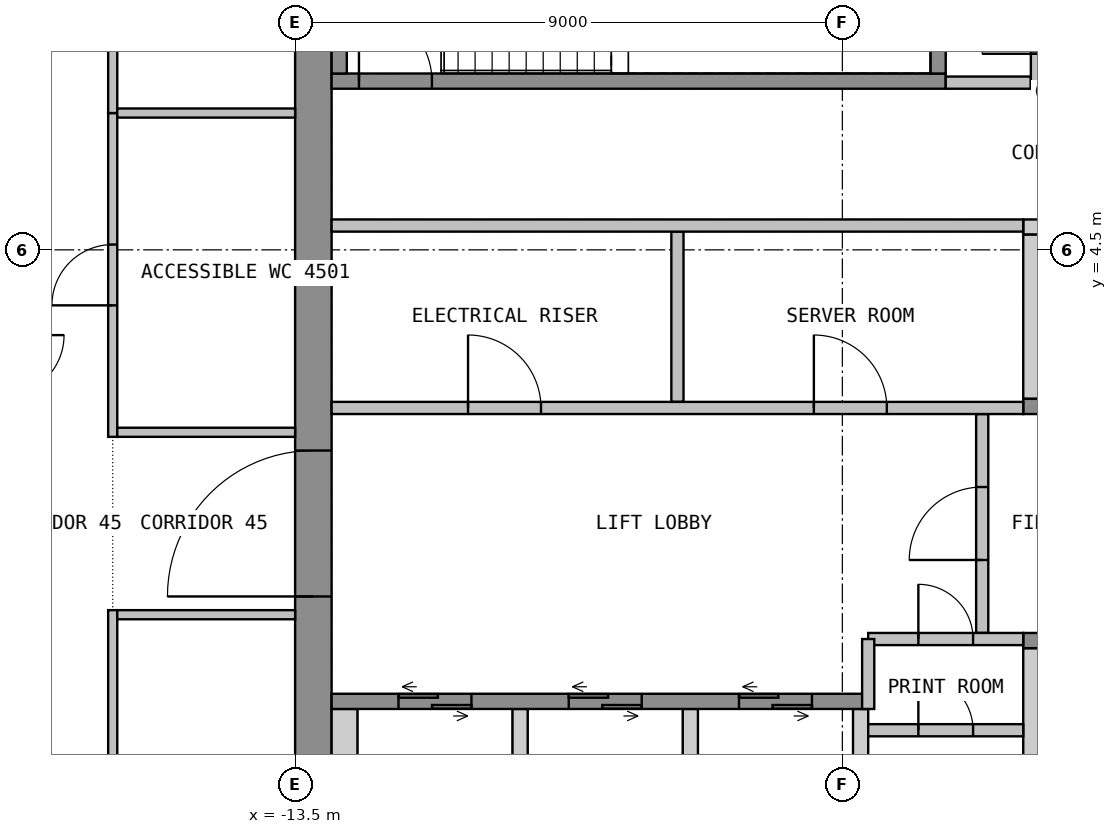
"""IFC4 building model, lengths in metres.
Left out: names, types, materials, properties, quantities, classifications, styles, units other than length and angle.
Written with IfcOpenShell. Run it as: python <this file> out.ifc"""

import sys

from ifc_helpers import new_model, si_unit, direction, frame, frame_2d, origin, place, context, subcontext, project, spatial, polyline, rectangle, outline, extrude, element, fill, save


model = new_model("IFC4")
c1 = context("Model", 3, precision=1e-05, world=origin(), true_north=direction((0.0, 1.0)))
c2 = subcontext(c1, "Body", "Model", "MODEL_VIEW")
j1 = project(units=[si_unit("LENGTHUNIT", "METRE"), si_unit("PLANEANGLEUNIT", "RADIAN")], contexts=[c1])
p1 = place(None, origin())
s1 = spatial("IfcSite", under=j1, at=p1, CompositionType="ELEMENT")
p2 = place(p1, origin())
s2 = spatial("IfcBuilding", under=s1, at=p2, CompositionType="ELEMENT")
p3 = place(p2, frame((0.0, 0.0, 183.9)))
s3 = spatial("IfcBuildingStorey", under=s2, at=p3, CompositionType="ELEMENT", Elevation=183.9)
p4 = place(p3, frame((-13.2, -10.65, 0.0), z_axis=(0.0, 0.0, 1.0), x_axis=(0.0, 1.0, 0.0)))
e1 = element("IfcWall", 1, at=p4, inside=s3, PredefinedType="SHEAR", context=c2, shape_type="SweptSolid", body=[
    extrude(rectangle(XDim=21.3, YDim=0.6, at=frame_2d((10.65, 0.0))), origin(), (0.0, 0.0, 1.0), 3.55),
])
p5 = place(p4, frame((9.45, 0.0, 0.0)))
e2 = element("IfcOpeningElement", 2, at=p5, cuts=e1, PredefinedType="OPENING", context=c2, shape_type="SweptSolid", body=[
    extrude(rectangle(XDim=2.4, YDim=2.1, at=frame_2d((1.2, 1.05))), frame((0.0, 0.31, 0.0), z_axis=(0.0, -1.0, 0.0), x_axis=(1.0, 0.0, 0.0)), (0.0, 0.0, 1.0), 0.62),
])
p6 = place(p3, origin())
e3 = element("IfcWall", 3, at=p6, inside=s3, PredefinedType="SHEAR", context=c2, shape_type="SweptSolid", body=[
    extrude(outline(polyline([(-1.525, 4.75), (1.525, 4.75), (1.525, 5.0), (-1.525, 5.0), (-1.525, 4.75)])), origin(), (0.0, 0.0, 1.0), 3.55),
])
p7 = place(p3, origin())
e4 = element("IfcWall", 4, at=p7, inside=s3, PredefinedType="SHEAR", context=c2, shape_type="SweptSolid", body=[
    extrude(outline(polyline([(-1.525, 2.05), (-1.275, 2.05), (-1.275, 4.75), (-1.525, 4.75), (-1.525, 2.05)])), origin(), (0.0, 0.0, 1.0), 3.55),
])
p8 = place(p3, frame((-1.525, 1.925, 0.0), z_axis=(0.0, 0.0, 1.0), x_axis=(1.0, 0.0, 0.0)))
e5 = element("IfcWall", 5, at=p8, inside=s3, PredefinedType="SHEAR", context=c2, shape_type="SweptSolid", body=[
    extrude(rectangle(XDim=3.05, YDim=0.25, at=frame_2d((1.525, 0.0))), origin(), (0.0, 0.0, 1.0), 3.55),
])
p9 = place(p8, frame((0.925, 0.0, 0.0)))
e6 = element("IfcOpeningElement", 6, at=p9, cuts=e5, PredefinedType="OPENING", context=c2, shape_type="SweptSolid", body=[
    extrude(rectangle(XDim=1.2, YDim=2.1, at=frame_2d((0.6, 1.05))), frame((0.0, 0.135, 0.0), z_axis=(0.0, -1.0, 0.0), x_axis=(1.0, 0.0, 0.0)), (0.0, 0.0, 1.0), 0.27),
])
p10 = place(p3, origin())
e7 = element("IfcWall", 7, at=p10, inside=s3, PredefinedType="SHEAR", context=c2, shape_type="SweptSolid", body=[
    extrude(outline(polyline([(-12.9, -4.75), (-12.475, -4.75), (-12.475, -3.05), (-12.9, -3.05), (-12.9, -4.75)])), origin(), (0.0, 0.0, 1.0), 3.55),
])
p11 = place(p3, origin())
e8 = element("IfcWall", 8, at=p11, inside=s3, PredefinedType="SHEAR", context=c2, shape_type="SweptSolid", body=[
    extrude(outline(polyline([(-9.925, -4.75), (-9.675, -4.75), (-9.675, -3.05), (-9.925, -3.05), (-9.925, -4.75)])), origin(), (0.0, 0.0, 1.0), 3.55),
])
p12 = place(p3, origin())
e9 = element("IfcWall", 9, at=p12, inside=s3, PredefinedType="SHEAR", context=c2, shape_type="SweptSolid", body=[
    extrude(outline(polyline([(-7.125, -4.75), (-6.875, -4.75), (-6.875, -3.05), (-7.125, -3.05), (-7.125, -4.75)])), origin(), (0.0, 0.0, 1.0), 3.55),
])
p13 = place(p3, origin())
e10 = element("IfcWall", 10, at=p13, inside=s3, PredefinedType="SHEAR", context=c2, shape_type="SweptSolid", body=[
    extrude(outline(polyline([(-4.325, -4.75), (-4.075, -4.75), (-4.075, -3.05), (-4.325, -3.05), (-4.325, -4.75)])), origin(), (0.0, 0.0, 1.0), 3.55),
])
p14 = place(p3, origin())
e11 = element("IfcWall", 11, at=p14, inside=s3, PredefinedType="SHEAR", context=c2, shape_type="SweptSolid", body=[
    extrude(outline(polyline([(-1.525, -4.75), (-1.275, -4.75), (-1.275, -2.05), (-1.525, -2.05), (-1.525, -4.75)])), origin(), (0.0, 0.0, 1.0), 3.55),
])
p15 = place(p3, frame((-12.9, -2.925, 0.0), z_axis=(0.0, 0.0, 1.0), x_axis=(1.0, 0.0, 0.0)))
e12 = element("IfcWall", 12, at=p15, inside=s3, PredefinedType="SHEAR", context=c2, shape_type="SweptSolid", body=[
    extrude(rectangle(XDim=8.825, YDim=0.25, at=frame_2d((4.413, 0.0))), origin(), (0.0, 0.0, 1.0), 3.55),
])
p16 = place(p15, frame((1.1, 0.0, 0.0)))
e13 = element("IfcOpeningElement", 13, at=p16, cuts=e12, PredefinedType="OPENING", context=c2, shape_type="SweptSolid", body=[
    extrude(rectangle(XDim=1.2, YDim=2.1, at=frame_2d((0.6, 1.05))), frame((0.0, 0.135, 0.0), z_axis=(0.0, -1.0, 0.0), x_axis=(1.0, 0.0, 0.0)), (0.0, 0.0, 1.0), 0.27),
])
p17 = place(p15, frame((3.9, 0.0, 0.0)))
e14 = element("IfcOpeningElement", 14, at=p17, cuts=e12, PredefinedType="OPENING", context=c2, shape_type="SweptSolid", body=[
    extrude(rectangle(XDim=1.2, YDim=2.1, at=frame_2d((0.6, 1.05))), frame((0.0, 0.135, 0.0), z_axis=(0.0, -1.0, 0.0), x_axis=(1.0, 0.0, 0.0)), (0.0, 0.0, 1.0), 0.27),
])
p18 = place(p15, frame((6.7, 0.0, 0.0)))
e15 = element("IfcOpeningElement", 15, at=p18, cuts=e12, PredefinedType="OPENING", context=c2, shape_type="SweptSolid", body=[
    extrude(rectangle(XDim=1.2, YDim=2.1, at=frame_2d((0.6, 1.05))), frame((0.0, 0.135, 0.0), z_axis=(0.0, -1.0, 0.0), x_axis=(1.0, 0.0, 0.0)), (0.0, 0.0, 1.0), 0.27),
])
p19 = place(p3, frame((-1.525, -1.925, 0.0), z_axis=(0.0, 0.0, 1.0), x_axis=(1.0, 0.0, 0.0)))
e16 = element("IfcWall", 16, at=p19, inside=s3, PredefinedType="SHEAR", context=c2, shape_type="SweptSolid", body=[
    extrude(rectangle(XDim=14.425, YDim=0.25, at=frame_2d((7.212, 0.0))), origin(), (0.0, 0.0, 1.0), 3.55),
])
p20 = place(p19, frame((0.925, 0.0, 0.0)))
e17 = element("IfcOpeningElement", 17, at=p20, cuts=e16, PredefinedType="OPENING", context=c2, shape_type="SweptSolid", body=[
    extrude(rectangle(XDim=1.2, YDim=2.1, at=frame_2d((0.6, 1.05))), frame((0.0, 0.135, 0.0), z_axis=(0.0, -1.0, 0.0), x_axis=(1.0, 0.0, 0.0)), (0.0, 0.0, 1.0), 0.27),
])
p21 = place(p19, frame((3.725, 0.0, 0.0)))
e18 = element("IfcOpeningElement", 18, at=p21, cuts=e16, PredefinedType="OPENING", context=c2, shape_type="SweptSolid", body=[
    extrude(rectangle(XDim=1.2, YDim=2.1, at=frame_2d((0.6, 1.05))), frame((0.0, 0.135, 0.0), z_axis=(0.0, -1.0, 0.0), x_axis=(1.0, 0.0, 0.0)), (0.0, 0.0, 1.0), 0.27),
])
p22 = place(p3, frame((-2.2, -1.8, 0.0), z_axis=(0.0, 0.0, 1.0), x_axis=(0.0, 1.0, 0.0)))
e19 = element("IfcWall", 19, at=p22, inside=s3, PredefinedType="PARTITIONING", context=c2, shape_type="SweptSolid", body=[
    extrude(rectangle(XDim=3.6, YDim=0.2, at=frame_2d((1.8, 0.0))), origin(), (0.0, 0.0, 1.0), 3.55),
])
p23 = place(p22, frame((1.2, 0.0, 0.0)))
e20 = element("IfcOpeningElement", 20, at=p23, cuts=e19, PredefinedType="OPENING", context=c2, shape_type="SweptSolid", body=[
    extrude(rectangle(XDim=1.2, YDim=2.1, at=frame_2d((0.6, 1.05))), frame((0.0, 0.11, 0.0), z_axis=(0.0, -1.0, 0.0), x_axis=(1.0, 0.0, 0.0)), (0.0, 0.0, 1.0), 0.22),
])
p24 = place(p3, frame((-12.9, 7.275, 0.0), z_axis=(0.0, 0.0, 1.0), x_axis=(1.0, 0.0, 0.0)))
e21 = element("IfcWall", 21, at=p24, inside=s3, PredefinedType="SHEAR", context=c2, shape_type="SweptSolid", body=[
    extrude(rectangle(XDim=10.1, YDim=0.25, at=frame_2d((5.05, 0.0))), origin(), (0.0, 0.0, 1.0), 3.55),
])
p25 = place(p24, frame((0.45, 0.0, 0.0)))
e22 = element("IfcOpeningElement", 22, at=p25, cuts=e21, PredefinedType="OPENING", context=c2, shape_type="SweptSolid", body=[
    extrude(rectangle(XDim=1.2, YDim=2.1, at=frame_2d((0.6, 1.05))), frame((0.0, 0.135, 0.0), z_axis=(0.0, -1.0, 0.0), x_axis=(1.0, 0.0, 0.0)), (0.0, 0.0, 1.0), 0.27),
])
for number, where, z_axis, x_axis in (
    (23, (-12.775, 7.4, 0.0), (0.0, 0.0, 1.0), (0.0, 1.0, 0.0)),
    (24, (-2.925, 7.4, 0.0), (0.0, 0.0, 1.0), (0.0, 1.0, 0.0)),
):
    element("IfcWall", number, at=place(p3, frame(where, z_axis=z_axis, x_axis=x_axis)), inside=s3, PredefinedType="SHEAR", context=c2, shape_type="SweptSolid", body=[
        extrude(rectangle(XDim=3.25, YDim=0.25, at=frame_2d((1.625, 0.0))), origin(), (0.0, 0.0, 1.0), 3.55),
    ])
p26 = place(p3, frame((-2.8, 7.25, 0.0), z_axis=(0.0, 0.0, 1.0), x_axis=(1.0, 0.0, 0.0)))
e25 = element("IfcWall", 25, at=p26, inside=s3, PredefinedType="PARTITIONING", context=c2, shape_type="SweptSolid", body=[
    extrude(rectangle(XDim=1.4, YDim=0.2, at=frame_2d((0.7, 0.0))), origin(), (0.0, 0.0, 1.0), 3.55),
])
p27 = place(p3, frame((-1.3, 7.15, 0.0), z_axis=(0.0, 0.0, 1.0), x_axis=(0.0, 1.0, 0.0)))
e26 = element("IfcWall", 26, at=p27, inside=s3, PredefinedType="PARTITIONING", context=c2, shape_type="SweptSolid", body=[
    extrude(rectangle(XDim=3.5, YDim=0.2, at=frame_2d((1.75, 0.0))), origin(), (0.0, 0.0, 1.0), 3.55),
])
p28 = place(p27, frame((0.575, 0.0, 0.0)))
e27 = element("IfcOpeningElement", 27, at=p28, cuts=e26, PredefinedType="OPENING", context=c2, shape_type="SweptSolid", body=[
    extrude(rectangle(XDim=0.9, YDim=2.1, at=frame_2d((0.45, 1.05))), frame((0.0, 0.11, 0.0), z_axis=(0.0, -1.0, 0.0), x_axis=(1.0, 0.0, 0.0)), (0.0, 0.0, 1.0), 0.22),
])
p29 = place(p27, frame((2.225, 0.0, 0.0)))
e28 = element("IfcOpeningElement", 28, at=p29, cuts=e26, PredefinedType="OPENING", context=c2, shape_type="SweptSolid", body=[
    extrude(rectangle(XDim=0.9, YDim=2.1, at=frame_2d((0.45, 1.05))), frame((0.0, 0.11, 0.0), z_axis=(0.0, -1.0, 0.0), x_axis=(1.0, 0.0, 0.0)), (0.0, 0.0, 1.0), 0.22),
])
p30 = place(p3, frame((-7.212, 2.0, 0.0), z_axis=(0.0, 0.0, 1.0), x_axis=(0.0, 1.0, 0.0)))
e29 = element("IfcWall", 29, at=p30, inside=s3, PredefinedType="PARTITIONING", context=c2, shape_type="SweptSolid", body=[
    extrude(rectangle(XDim=2.8, YDim=0.2, at=frame_2d((1.4, 0.0))), origin(), (0.0, 0.0, 1.0), 3.55),
])
p31 = place(p3, frame((-12.9, 1.9, 0.0), z_axis=(0.0, 0.0, 1.0), x_axis=(1.0, 0.0, 0.0)))
e30 = element("IfcWall", 30, at=p31, inside=s3, PredefinedType="PARTITIONING", context=c2, shape_type="SweptSolid", body=[
    extrude(rectangle(XDim=11.375, YDim=0.2, at=frame_2d((5.688, 0.0))), origin(), (0.0, 0.0, 1.0), 3.55),
])
p32 = place(p31, frame((2.244, 0.0, 0.0)))
e31 = element("IfcOpeningElement", 31, at=p32, cuts=e30, PredefinedType="OPENING", context=c2, shape_type="SweptSolid", body=[
    extrude(rectangle(XDim=1.2, YDim=2.1, at=frame_2d((0.6, 1.05))), frame((0.0, 0.11, 0.0), z_axis=(0.0, -1.0, 0.0), x_axis=(1.0, 0.0, 0.0)), (0.0, 0.0, 1.0), 0.22),
])
p33 = place(p31, frame((7.931, 0.0, 0.0)))
e32 = element("IfcOpeningElement", 32, at=p33, cuts=e30, PredefinedType="OPENING", context=c2, shape_type="SweptSolid", body=[
    extrude(rectangle(XDim=1.2, YDim=2.1, at=frame_2d((0.6, 1.05))), frame((0.0, 0.11, 0.0), z_axis=(0.0, -1.0, 0.0), x_axis=(1.0, 0.0, 0.0)), (0.0, 0.0, 1.0), 0.22),
])
p34 = place(p3, frame((-12.9, 4.9, 0.0), z_axis=(0.0, 0.0, 1.0), x_axis=(1.0, 0.0, 0.0)))
e33 = element("IfcWall", 33, at=p34, inside=s3, PredefinedType="PARTITIONING", context=c2, shape_type="SweptSolid", body=[
    extrude(rectangle(XDim=11.375, YDim=0.2, at=frame_2d((5.688, 0.0))), origin(), (0.0, 0.0, 1.0), 3.55),
])
p35 = place(p3, frame((-4.075, -3.4, 0.0), z_axis=(0.0, 0.0, 1.0), x_axis=(1.0, 0.0, 0.0)))
e34 = element("IfcWall", 34, at=p35, inside=s3, PredefinedType="PARTITIONING", context=c2, shape_type="SweptSolid", body=[
    extrude(rectangle(XDim=2.55, YDim=0.2, at=frame_2d((1.275, 0.0))), origin(), (0.0, 0.0, 1.0), 3.55),
])
p36 = place(p35, frame((0.825, 0.0, 0.0)))
e35 = element("IfcOpeningElement", 35, at=p36, cuts=e34, PredefinedType="OPENING", context=c2, shape_type="SweptSolid", body=[
    extrude(rectangle(XDim=0.9, YDim=2.1, at=frame_2d((0.45, 1.05))), frame((0.0, 0.11, 0.0), z_axis=(0.0, -1.0, 0.0), x_axis=(1.0, 0.0, 0.0)), (0.0, 0.0, 1.0), 0.22),
])
p37 = place(p3, frame((-4.075, -1.9, 0.0), z_axis=(0.0, 0.0, 1.0), x_axis=(1.0, 0.0, 0.0)))
e36 = element("IfcWall", 36, at=p37, inside=s3, PredefinedType="PARTITIONING", context=c2, shape_type="SweptSolid", body=[
    extrude(rectangle(XDim=2.55, YDim=0.2, at=frame_2d((1.275, 0.0))), origin(), (0.0, 0.0, 1.0), 3.55),
])
p38 = place(p37, frame((0.825, 0.0, 0.0)))
e37 = element("IfcOpeningElement", 37, at=p38, cuts=e36, PredefinedType="OPENING", context=c2, shape_type="SweptSolid", body=[
    extrude(rectangle(XDim=0.9, YDim=2.1, at=frame_2d((0.45, 1.05))), frame((0.0, 0.11, 0.0), z_axis=(0.0, -1.0, 0.0), x_axis=(1.0, 0.0, 0.0)), (0.0, 0.0, 1.0), 0.22),
])
p39 = place(p3, frame((-4.075, -1.9, 0.0), z_axis=(0.0, 0.0, 1.0), x_axis=(0.0, -1.0, 0.0)))
e38 = element("IfcWall", 38, at=p39, inside=s3, PredefinedType="PARTITIONING", context=c2, shape_type="SweptSolid", body=[
    extrude(rectangle(XDim=1.15, YDim=0.2, at=frame_2d((0.575, 0.0))), origin(), (0.0, 0.0, 1.0), 3.55),
])
p40 = place(p3, frame((-16.5, -14.325, 0.0), z_axis=(0.0, 0.0, 1.0), x_axis=(0.0, 1.0, 0.0)))
e39 = element("IfcWall", 39, at=p40, inside=s3, PredefinedType="PARTITIONING", context=c2, shape_type="SweptSolid", body=[
    extrude(rectangle(XDim=12.9, YDim=0.15, at=frame_2d((6.45, 0.0))), origin(), (0.0, 0.0, 1.0), 3.55),
])
p41 = place(p40, frame((5.95, 0.0, 0.0)))
e40 = element("IfcOpeningElement", 40, at=p41, cuts=e39, PredefinedType="OPENING", context=c2, shape_type="SweptSolid", body=[
    extrude(rectangle(XDim=1.0, YDim=2.1, at=frame_2d((0.5, 1.05))), frame((0.0, 0.085, 0.0), z_axis=(0.0, -1.0, 0.0), x_axis=(1.0, 0.0, 0.0)), (0.0, 0.0, 1.0), 0.17),
])
p42 = place(p3, frame((-16.425, -1.5, 0.0), z_axis=(0.0, 0.0, 1.0), x_axis=(1.0, 0.0, 0.0)))
e41 = element("IfcWall", 41, at=p42, inside=s3, PredefinedType="PARTITIONING", context=c2, shape_type="SweptSolid", body=[
    extrude(rectangle(XDim=2.925, YDim=0.15, at=frame_2d((1.462, 0.0))), origin(), (0.0, 0.0, 1.0), 3.55),
])
p43 = place(p3, frame((-16.5, 1.425, 0.0), z_axis=(0.0, 0.0, 1.0), x_axis=(0.0, 1.0, 0.0)))
e42 = element("IfcWall", 42, at=p43, inside=s3, PredefinedType="PARTITIONING", context=c2, shape_type="SweptSolid", body=[
    extrude(rectangle(XDim=5.325, YDim=0.15, at=frame_2d((2.663, 0.0))), origin(), (0.0, 0.0, 1.0), 3.55),
])
p44 = place(p43, frame((2.163, 0.0, 0.0)))
e43 = element("IfcOpeningElement", 43, at=p44, cuts=e42, PredefinedType="OPENING", context=c2, shape_type="SweptSolid", body=[
    extrude(rectangle(XDim=1.0, YDim=2.1, at=frame_2d((0.5, 1.05))), frame((0.0, 0.085, 0.0), z_axis=(0.0, -1.0, 0.0), x_axis=(1.0, 0.0, 0.0)), (0.0, 0.0, 1.0), 0.17),
])
p45 = place(p3, frame((-13.5, 1.5, 0.0), z_axis=(0.0, 0.0, 1.0), x_axis=(-1.0, 0.0, 0.0)))
e44 = element("IfcWall", 44, at=p45, inside=s3, PredefinedType="PARTITIONING", context=c2, shape_type="SweptSolid", body=[
    extrude(rectangle(XDim=2.925, YDim=0.15, at=frame_2d((1.462, 0.0))), origin(), (0.0, 0.0, 1.0), 3.55),
])
p46 = place(p3, frame((-16.5, 6.75, 0.0), z_axis=(0.0, 0.0, 1.0), x_axis=(0.0, 1.0, 0.0)))
e45 = element("IfcWall", 45, at=p46, inside=s3, PredefinedType="PARTITIONING", context=c2, shape_type="SweptSolid", body=[
    extrude(rectangle(XDim=7.575, YDim=0.15, at=frame_2d((3.788, 0.0))), origin(), (0.0, 0.0, 1.0), 3.55),
])
p47 = place(p46, frame((3.288, 0.0, 0.0)))
e46 = element("IfcOpeningElement", 46, at=p47, cuts=e45, PredefinedType="OPENING", context=c2, shape_type="SweptSolid", body=[
    extrude(rectangle(XDim=1.0, YDim=2.1, at=frame_2d((0.5, 1.05))), frame((0.0, 0.085, 0.0), z_axis=(0.0, -1.0, 0.0), x_axis=(1.0, 0.0, 0.0)), (0.0, 0.0, 1.0), 0.17),
])
p48 = place(p3, frame((-16.425, 6.75, 0.0), z_axis=(0.0, 0.0, 1.0), x_axis=(1.0, 0.0, 0.0)))
e47 = element("IfcWall", 47, at=p48, inside=s3, PredefinedType="PARTITIONING", context=c2, shape_type="SweptSolid", body=[
    extrude(rectangle(XDim=2.925, YDim=0.15, at=frame_2d((1.462, 0.0))), origin(), (0.0, 0.0, 1.0), 3.55),
])
p49 = place(p5, origin())
e48 = element("IfcDoor", 48, at=p49, inside=s3, OperationType="DOUBLE_DOOR_DOUBLE_SWING", PredefinedType="DOOR", context=c2, shape_type="SweptSolid", body=[
    extrude(rectangle(XDim=2.4, YDim=2.1, at=frame_2d((1.2, 1.05))), frame((0.0, 0.025, 0.0), z_axis=(0.0, -1.0, 0.0), x_axis=(1.0, 0.0, 0.0)), (0.0, 0.0, 1.0), 0.05),
])
fill(e2, e48)
p50 = place(p16, origin())
e49 = element("IfcDoor", 49, at=p50, inside=s3, OperationType="DOUBLE_DOOR_SLIDING", PredefinedType="DOOR", context=c2, shape_type="SweptSolid", body=[
    extrude(rectangle(XDim=1.2, YDim=2.1, at=frame_2d((0.6, 1.05))), frame((0.0, 0.025, 0.0), z_axis=(0.0, -1.0, 0.0), x_axis=(1.0, 0.0, 0.0)), (0.0, 0.0, 1.0), 0.05),
])
fill(e13, e49)
p51 = place(p17, origin())
e50 = element("IfcDoor", 50, at=p51, inside=s3, OperationType="DOUBLE_DOOR_SLIDING", PredefinedType="DOOR", context=c2, shape_type="SweptSolid", body=[
    extrude(rectangle(XDim=1.2, YDim=2.1, at=frame_2d((0.6, 1.05))), frame((0.0, 0.025, 0.0), z_axis=(0.0, -1.0, 0.0), x_axis=(1.0, 0.0, 0.0)), (0.0, 0.0, 1.0), 0.05),
])
fill(e14, e50)
p52 = place(p18, origin())
e51 = element("IfcDoor", 51, at=p52, inside=s3, OperationType="DOUBLE_DOOR_SLIDING", PredefinedType="DOOR", context=c2, shape_type="SweptSolid", body=[
    extrude(rectangle(XDim=1.2, YDim=2.1, at=frame_2d((0.6, 1.05))), frame((0.0, 0.025, 0.0), z_axis=(0.0, -1.0, 0.0), x_axis=(1.0, 0.0, 0.0)), (0.0, 0.0, 1.0), 0.05),
])
fill(e15, e51)
p53 = place(p23, origin())
e52 = element("IfcDoor", 52, at=p53, inside=s3, OperationType="SINGLE_SWING_LEFT", PredefinedType="DOOR", context=c2, shape_type="SweptSolid", body=[
    extrude(rectangle(XDim=1.2, YDim=2.1, at=frame_2d((0.6, 1.05))), frame((0.0, 0.025, 0.0), z_axis=(0.0, -1.0, 0.0), x_axis=(1.0, 0.0, 0.0)), (0.0, 0.0, 1.0), 0.05),
])
fill(e20, e52)
p54 = place(p25, origin())
e53 = element("IfcDoor", 53, at=p54, inside=s3, OperationType="SINGLE_SWING_LEFT", PredefinedType="DOOR", context=c2, shape_type="SweptSolid", body=[
    extrude(rectangle(XDim=1.2, YDim=2.1, at=frame_2d((0.6, 1.05))), frame((0.0, 0.025, 0.0), z_axis=(0.0, -1.0, 0.0), x_axis=(1.0, 0.0, 0.0)), (0.0, 0.0, 1.0), 0.05),
])
fill(e22, e53)
p55 = place(p28, origin())
e54 = element("IfcDoor", 54, at=p55, inside=s3, OperationType="SINGLE_SWING_LEFT", PredefinedType="DOOR", context=c2, shape_type="SweptSolid", body=[
    extrude(rectangle(XDim=0.9, YDim=2.1, at=frame_2d((0.45, 1.05))), frame((0.0, 0.025, 0.0), z_axis=(0.0, -1.0, 0.0), x_axis=(1.0, 0.0, 0.0)), (0.0, 0.0, 1.0), 0.05),
])
fill(e27, e54)
p56 = place(p32, origin())
e55 = element("IfcDoor", 55, at=p56, inside=s3, OperationType="SINGLE_SWING_RIGHT", PredefinedType="DOOR", context=c2, shape_type="SweptSolid", body=[
    extrude(rectangle(XDim=1.2, YDim=2.1, at=frame_2d((0.6, 1.05))), frame((0.0, 0.025, 0.0), z_axis=(0.0, -1.0, 0.0), x_axis=(1.0, 0.0, 0.0)), (0.0, 0.0, 1.0), 0.05),
])
fill(e31, e55)
p57 = place(p33, origin())
e56 = element("IfcDoor", 56, at=p57, inside=s3, OperationType="SINGLE_SWING_RIGHT", PredefinedType="DOOR", context=c2, shape_type="SweptSolid", body=[
    extrude(rectangle(XDim=1.2, YDim=2.1, at=frame_2d((0.6, 1.05))), frame((0.0, 0.025, 0.0), z_axis=(0.0, -1.0, 0.0), x_axis=(1.0, 0.0, 0.0)), (0.0, 0.0, 1.0), 0.05),
])
fill(e32, e56)
p58 = place(p36, origin())
e57 = element("IfcDoor", 57, at=p58, inside=s3, OperationType="SINGLE_SWING_LEFT", PredefinedType="DOOR", context=c2, shape_type="SweptSolid", body=[
    extrude(rectangle(XDim=0.9, YDim=2.1, at=frame_2d((0.45, 1.05))), frame((0.0, 0.025, 0.0), z_axis=(0.0, -1.0, 0.0), x_axis=(1.0, 0.0, 0.0)), (0.0, 0.0, 1.0), 0.05),
])
fill(e35, e57)
p59 = place(p38, origin())
e58 = element("IfcDoor", 58, at=p59, inside=s3, OperationType="SINGLE_SWING_LEFT", PredefinedType="DOOR", context=c2, shape_type="SweptSolid", body=[
    extrude(rectangle(XDim=0.9, YDim=2.1, at=frame_2d((0.45, 1.05))), frame((0.0, 0.025, 0.0), z_axis=(0.0, -1.0, 0.0), x_axis=(1.0, 0.0, 0.0)), (0.0, 0.0, 1.0), 0.05),
])
fill(e37, e58)
p60 = place(p44, origin())
e59 = element("IfcDoor", 59, at=p60, inside=s3, OperationType="SINGLE_SWING_RIGHT", PredefinedType="DOOR", context=c2, shape_type="SweptSolid", body=[
    extrude(rectangle(XDim=1.0, YDim=2.1, at=frame_2d((0.5, 1.05))), frame((0.0, 0.025, 0.0), z_axis=(0.0, -1.0, 0.0), x_axis=(1.0, 0.0, 0.0)), (0.0, 0.0, 1.0), 0.05),
])
fill(e43, e59)
save(model, sys.argv[1])
